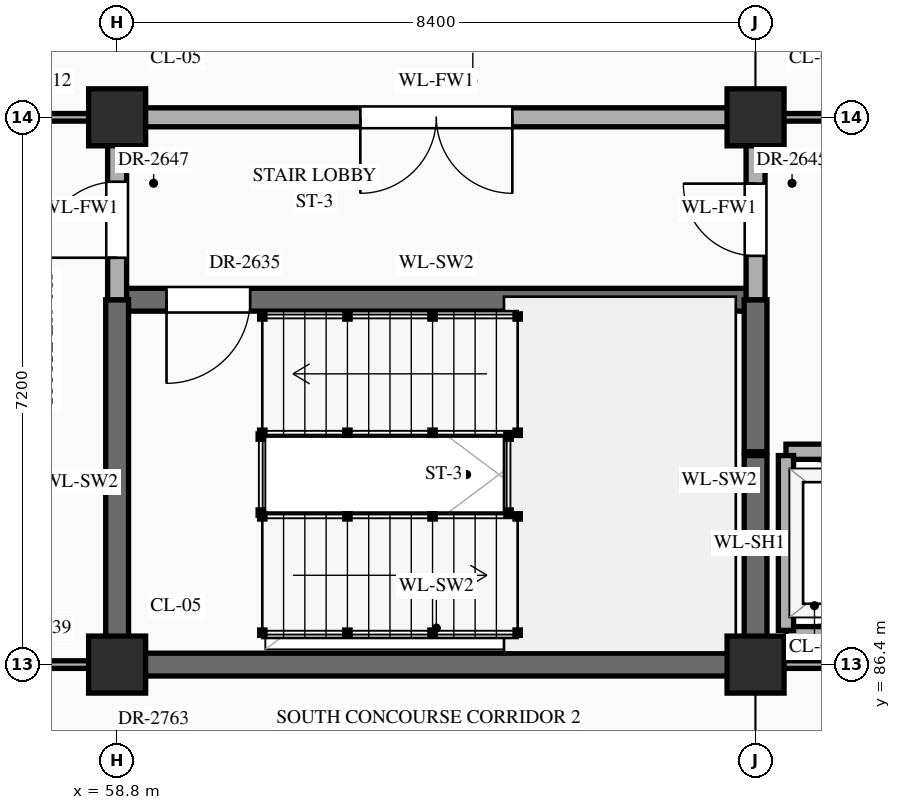
"""IFC4 building model, lengths in metres.
Left out: names, types, materials, properties, quantities, classifications, styles, units other than length and angle.
Written with IfcOpenShell. Run it as: python <this file> out.ifc"""

import sys

from ifc_helpers import new_model, si_unit, direction, frame, frame_2d, origin, origin_2d, place, context, subcontext, project, spatial, rectangle, extrude, element, fill, save


model = new_model("IFC4")
c1 = context("Model", 3, precision=1e-05, world=origin(), true_north=direction((0.0, 1.0)))
c2 = subcontext(c1, "Body", "Model", "MODEL_VIEW")
j1 = project(units=[si_unit("LENGTHUNIT", "METRE"), si_unit("PLANEANGLEUNIT", "RADIAN")], contexts=[c1])
p1 = place(None, origin())
s1 = spatial("IfcSite", under=j1, at=p1, CompositionType="ELEMENT")
p2 = place(p1, origin())
s2 = spatial("IfcBuilding", under=s1, at=p2, CompositionType="ELEMENT")
p3 = place(p2, frame((0.0, 0.0, 39.3)))
s3 = spatial("IfcBuildingStorey", under=s2, at=p3, CompositionType="ELEMENT", Elevation=39.3)
for number, where, z_axis, x_axis in (
    (1, (58.8, 86.4, 0.0), (0.0, 0.0, 1.0), (1.0, 0.0, 0.0)),
    (2, (58.8, 93.6, 0.0), (0.0, 0.0, 1.0), (1.0, 0.0, 0.0)),
    (3, (67.2, 86.4, 0.0), (0.0, 0.0, 1.0), (1.0, 0.0, 0.0)),
    (4, (67.2, 93.6, 0.0), (0.0, 0.0, 1.0), (1.0, 0.0, 0.0)),
):
    element("IfcColumn", number, at=place(p3, frame(where, z_axis=z_axis, x_axis=x_axis)), inside=s3, PredefinedType="COLUMN", context=c2, shape_type="SweptSolid", body=[
        extrude(rectangle(XDim=0.75, YDim=0.75, at=origin_2d()), origin(), (0.0, 0.0, 1.0), 4.2),
    ])
p4 = place(p3, frame((50.4, 86.4, 0.0), z_axis=(0.0, 0.0, 1.0), x_axis=(1.0, 0.0, 0.0)))
e5 = element("IfcWall", 5, at=p4, inside=s3, PredefinedType="STANDARD", context=c2, shape_type="SweptSolid", body=[
    extrude(rectangle(XDim=8.4, YDim=0.1, at=frame_2d((4.2, 0.0))), origin(), (0.0, 0.0, 1.0), 3.1),
])
p5 = place(p4, frame((0.968, 0.0, 0.0)))
e6 = element("IfcOpeningElement", 6, at=p5, cuts=e5, PredefinedType="OPENING", context=c2, shape_type="SweptSolid", body=[
    extrude(rectangle(XDim=1.16, YDim=2.3, at=frame_2d((0.58, 1.15))), frame((0.0, 0.062, 0.0), z_axis=(0.0, -1.0, 0.0), x_axis=(1.0, 0.0, 0.0)), (0.0, 0.0, 1.0), 0.124),
])
p6 = place(p4, frame((3.58, 0.0, 0.0)))
e7 = element("IfcOpeningElement", 7, at=p6, cuts=e5, PredefinedType="OPENING", context=c2, shape_type="SweptSolid", body=[
    extrude(rectangle(XDim=1.24, YDim=2.3, at=frame_2d((0.62, 1.15))), frame((0.0, 0.062, 0.0), z_axis=(0.0, -1.0, 0.0), x_axis=(1.0, 0.0, 0.0)), (0.0, 0.0, 1.0), 0.124),
])
p7 = place(p4, frame((6.212, 0.0, 0.0)))
e8 = element("IfcOpeningElement", 8, at=p7, cuts=e5, PredefinedType="OPENING", context=c2, shape_type="SweptSolid", body=[
    extrude(rectangle(XDim=1.28, YDim=2.35, at=frame_2d((0.64, 1.175))), frame((0.0, 0.062, 0.0), z_axis=(0.0, -1.0, 0.0), x_axis=(1.0, 0.0, 0.0)), (0.0, 0.0, 1.0), 0.124),
])
p8 = place(p3, frame((58.8, 86.4, 0.0), z_axis=(0.0, 0.0, 1.0), x_axis=(1.0, 0.0, 0.0)))
e9 = element("IfcWall", 9, at=p8, inside=s3, PredefinedType="SHEAR", context=c2, shape_type="SweptSolid", body=[
    extrude(rectangle(XDim=8.4, YDim=0.3, at=frame_2d((4.2, 0.0))), origin(), (0.0, 0.0, 1.0), 3.95),
])
p9 = place(p3, frame((67.25, 86.4, 0.0), z_axis=(0.0, 0.0, 1.0), x_axis=(1.0, 0.0, 0.0)))
e10 = element("IfcWall", 10, at=p9, inside=s3, PredefinedType="STANDARD", context=c2, shape_type="SweptSolid", body=[
    extrude(rectangle(XDim=8.3, YDim=0.1, at=frame_2d((4.15, 0.0))), origin(), (0.0, 0.0, 1.0), 3.1),
])
p10 = place(p3, frame((67.6, 86.8, 0.0), z_axis=(0.0, 0.0, 1.0), x_axis=(1.0, 0.0, 0.0)))
e11 = element("IfcWall", 11, at=p10, inside=s3, PredefinedType="STANDARD", context=c2, shape_type="SweptSolid", body=[
    extrude(rectangle(XDim=2.5, YDim=0.2, at=frame_2d((1.25, 0.0))), origin(), (0.0, 0.0, 1.0), 3.95),
])
p11 = place(p3, frame((67.6, 89.2, 0.0), z_axis=(0.0, 0.0, 1.0), x_axis=(1.0, 0.0, 0.0)))
e12 = element("IfcWall", 12, at=p11, inside=s3, PredefinedType="STANDARD", context=c2, shape_type="SweptSolid", body=[
    extrude(rectangle(XDim=7.7, YDim=0.2, at=frame_2d((3.85, 0.0))), origin(), (0.0, 0.0, 1.0), 3.95),
])
p12 = place(p11, frame((0.725, 0.0, 0.0)))
e13 = element("IfcOpeningElement", 13, at=p12, cuts=e12, PredefinedType="OPENING", context=c2, shape_type="SweptSolid", body=[
    extrude(rectangle(XDim=1.1, YDim=2.15, at=frame_2d((0.55, 1.075))), frame((0.0, 0.112, 0.0), z_axis=(0.0, -1.0, 0.0), x_axis=(1.0, 0.0, 0.0)), (0.0, 0.0, 1.0), 0.224),
])
p13 = place(p11, frame((3.3, 0.0, 0.0)))
e14 = element("IfcOpeningElement", 14, at=p13, cuts=e12, PredefinedType="OPENING", context=c2, shape_type="SweptSolid", body=[
    extrude(rectangle(XDim=1.1, YDim=2.15, at=frame_2d((0.55, 1.075))), frame((0.0, 0.112, 0.0), z_axis=(0.0, -1.0, 0.0), x_axis=(1.0, 0.0, 0.0)), (0.0, 0.0, 1.0), 0.224),
])
p14 = place(p11, frame((5.875, 0.0, 0.0)))
e15 = element("IfcOpeningElement", 15, at=p14, cuts=e12, PredefinedType="OPENING", context=c2, shape_type="SweptSolid", body=[
    extrude(rectangle(XDim=1.1, YDim=2.15, at=frame_2d((0.55, 1.075))), frame((0.0, 0.112, 0.0), z_axis=(0.0, -1.0, 0.0), x_axis=(1.0, 0.0, 0.0)), (0.0, 0.0, 1.0), 0.224),
])
p15 = place(p3, frame((58.8, 91.2, 0.0), z_axis=(0.0, 0.0, 1.0), x_axis=(1.0, 0.0, 0.0)))
e16 = element("IfcWall", 16, at=p15, inside=s3, PredefinedType="SHEAR", context=c2, shape_type="SweptSolid", body=[
    extrude(rectangle(XDim=8.4, YDim=0.3, at=frame_2d((4.2, 0.0))), origin(), (0.0, 0.0, 1.0), 3.95),
])
p16 = place(p15, frame((0.65, 0.0, 0.0)))
e17 = element("IfcOpeningElement", 17, at=p16, cuts=e16, PredefinedType="OPENING", context=c2, shape_type="SweptSolid", body=[
    extrude(rectangle(XDim=1.1, YDim=2.2, at=frame_2d((0.55, 1.1))), frame((0.0, 0.162, 0.0), z_axis=(0.0, -1.0, 0.0), x_axis=(1.0, 0.0, 0.0)), (0.0, 0.0, 1.0), 0.324),
])
p17 = place(p3, frame((50.4, 93.6, 0.0), z_axis=(0.0, 0.0, 1.0), x_axis=(1.0, 0.0, 0.0)))
e18 = element("IfcWall", 18, at=p17, inside=s3, PredefinedType="STANDARD", context=c2, shape_type="SweptSolid", body=[
    extrude(rectangle(XDim=8.4, YDim=0.1, at=frame_2d((4.2, 0.0))), origin(), (0.0, 0.0, 1.0), 3.1),
])
p18 = place(p17, frame((0.978, 0.0, 0.0)))
e19 = element("IfcOpeningElement", 19, at=p18, cuts=e18, PredefinedType="OPENING", context=c2, shape_type="SweptSolid", body=[
    extrude(rectangle(XDim=1.14, YDim=2.4, at=frame_2d((0.57, 1.2))), frame((0.0, 0.062, 0.0), z_axis=(0.0, -1.0, 0.0), x_axis=(1.0, 0.0, 0.0)), (0.0, 0.0, 1.0), 0.124),
])
p19 = place(p17, frame((3.75, 0.0, 0.0)))
e20 = element("IfcOpeningElement", 20, at=p19, cuts=e18, PredefinedType="OPENING", context=c2, shape_type="SweptSolid", body=[
    extrude(rectangle(XDim=0.9, YDim=2.15, at=frame_2d((0.45, 1.075))), frame((0.0, 0.062, 0.0), z_axis=(0.0, -1.0, 0.0), x_axis=(1.0, 0.0, 0.0)), (0.0, 0.0, 1.0), 0.124),
])
p20 = place(p17, frame((6.423, 0.0, 0.0)))
e21 = element("IfcOpeningElement", 21, at=p20, cuts=e18, PredefinedType="OPENING", context=c2, shape_type="SweptSolid", body=[
    extrude(rectangle(XDim=0.86, YDim=2.1, at=frame_2d((0.43, 1.05))), frame((0.0, 0.062, 0.0), z_axis=(0.0, -1.0, 0.0), x_axis=(1.0, 0.0, 0.0)), (0.0, 0.0, 1.0), 0.124),
])
p21 = place(p3, frame((58.8, 93.6, 0.0), z_axis=(0.0, 0.0, 1.0), x_axis=(1.0, 0.0, 0.0)))
e22 = element("IfcWall", 22, at=p21, inside=s3, PredefinedType="STANDARD", context=c2, shape_type="SweptSolid", body=[
    extrude(rectangle(XDim=8.4, YDim=0.25, at=frame_2d((4.2, 0.0))), origin(), (0.0, 0.0, 1.0), 3.1),
])
p22 = place(p21, frame((3.2, 0.0, 0.0)))
e23 = element("IfcOpeningElement", 23, at=p22, cuts=e22, PredefinedType="OPENING", context=c2, shape_type="SweptSolid", body=[
    extrude(rectangle(XDim=2.0, YDim=2.4, at=frame_2d((1.0, 1.2))), frame((0.0, 0.137, 0.0), z_axis=(0.0, -1.0, 0.0), x_axis=(1.0, 0.0, 0.0)), (0.0, 0.0, 1.0), 0.274),
])
p23 = place(p3, frame((67.2, 93.6, 0.0), z_axis=(0.0, 0.0, 1.0), x_axis=(1.0, 0.0, 0.0)))
e24 = element("IfcWall", 24, at=p23, inside=s3, PredefinedType="STANDARD", context=c2, shape_type="SweptSolid", body=[
    extrude(rectangle(XDim=33.6, YDim=0.1, at=frame_2d((16.8, 0.0))), origin(), (0.0, 0.0, 1.0), 3.1),
])
p24 = place(p23, frame((3.425, 0.0, 0.0)))
e25 = element("IfcOpeningElement", 25, at=p24, cuts=e24, PredefinedType="OPENING", context=c2, shape_type="SweptSolid", body=[
    extrude(rectangle(XDim=1.55, YDim=2.35, at=frame_2d((0.775, 1.175))), frame((0.0, 0.062, 0.0), z_axis=(0.0, -1.0, 0.0), x_axis=(1.0, 0.0, 0.0)), (0.0, 0.0, 1.0), 0.124),
])
p25 = place(p23, frame((28.55, 0.0, 0.0)))
e26 = element("IfcOpeningElement", 26, at=p25, cuts=e24, PredefinedType="OPENING", context=c2, shape_type="SweptSolid", body=[
    extrude(rectangle(XDim=1.7, YDim=2.45, at=frame_2d((0.85, 1.225))), frame((0.0, 0.062, 0.0), z_axis=(0.0, -1.0, 0.0), x_axis=(1.0, 0.0, 0.0)), (0.0, 0.0, 1.0), 0.124),
])
p26 = place(p23, frame((11.825, 0.0, 0.0)))
e27 = element("IfcOpeningElement", 27, at=p26, cuts=e24, PredefinedType="OPENING", context=c2, shape_type="SweptSolid", body=[
    extrude(rectangle(XDim=1.55, YDim=2.35, at=frame_2d((0.775, 1.175))), frame((0.0, 0.062, 0.0), z_axis=(0.0, -1.0, 0.0), x_axis=(1.0, 0.0, 0.0)), (0.0, 0.0, 1.0), 0.124),
])
p27 = place(p23, frame((17.708, 0.0, 0.0)))
e28 = element("IfcOpeningElement", 28, at=p27, cuts=e24, PredefinedType="OPENING", context=c2, shape_type="SweptSolid", body=[
    extrude(rectangle(XDim=1.28, YDim=2.35, at=frame_2d((0.64, 1.175))), frame((0.0, 0.062, 0.0), z_axis=(0.0, -1.0, 0.0), x_axis=(1.0, 0.0, 0.0)), (0.0, 0.0, 1.0), 0.124),
])
p28 = place(p23, frame((20.53, 0.0, 0.0)))
e29 = element("IfcOpeningElement", 29, at=p28, cuts=e24, PredefinedType="OPENING", context=c2, shape_type="SweptSolid", body=[
    extrude(rectangle(XDim=0.94, YDim=2.3, at=frame_2d((0.47, 1.15))), frame((0.0, 0.062, 0.0), z_axis=(0.0, -1.0, 0.0), x_axis=(1.0, 0.0, 0.0)), (0.0, 0.0, 1.0), 0.124),
])
p29 = place(p23, frame((23.163, 0.0, 0.0)))
e30 = element("IfcOpeningElement", 30, at=p29, cuts=e24, PredefinedType="OPENING", context=c2, shape_type="SweptSolid", body=[
    extrude(rectangle(XDim=0.98, YDim=2.35, at=frame_2d((0.49, 1.175))), frame((0.0, 0.062, 0.0), z_axis=(0.0, -1.0, 0.0), x_axis=(1.0, 0.0, 0.0)), (0.0, 0.0, 1.0), 0.124),
])
p30 = place(p3, frame((58.8, 86.4, 0.0), z_axis=(0.0, 0.0, 1.0), x_axis=(0.0, 1.0, 0.0)))
e31 = element("IfcWall", 31, at=p30, inside=s3, PredefinedType="SHEAR", context=c2, shape_type="SweptSolid", body=[
    extrude(rectangle(XDim=4.8, YDim=0.3, at=frame_2d((2.4, 0.0))), origin(), (0.0, 0.0, 1.0), 3.95),
])
p31 = place(p3, frame((58.8, 91.2, 0.0), z_axis=(0.0, 0.0, 1.0), x_axis=(0.0, 1.0, 0.0)))
e32 = element("IfcWall", 32, at=p31, inside=s3, PredefinedType="STANDARD", context=c2, shape_type="SweptSolid", body=[
    extrude(rectangle(XDim=2.4, YDim=0.25, at=frame_2d((1.2, 0.0))), origin(), (0.0, 0.0, 1.0), 3.2),
])
p32 = place(p31, frame((0.552, 0.0, 0.0)))
e33 = element("IfcOpeningElement", 33, at=p32, cuts=e32, PredefinedType="OPENING", context=c2, shape_type="SweptSolid", body=[
    extrude(rectangle(XDim=1.0, YDim=2.2, at=frame_2d((0.5, 1.1))), frame((0.0, 0.137, 0.0), z_axis=(0.0, -1.0, 0.0), x_axis=(1.0, 0.0, 0.0)), (0.0, 0.0, 1.0), 0.274),
])
p33 = place(p3, frame((67.2, 86.45, 0.0), z_axis=(0.0, 0.0, 1.0), x_axis=(0.0, 1.0, 0.0)))
e34 = element("IfcWall", 34, at=p33, inside=s3, PredefinedType="SHEAR", context=c2, shape_type="SweptSolid", body=[
    extrude(rectangle(XDim=2.7, YDim=0.3, at=frame_2d((1.35, 0.0))), origin(), (0.0, 0.0, 1.0), 3.95),
])
p34 = place(p3, frame((67.2, 89.2, 0.0), z_axis=(0.0, 0.0, 1.0), x_axis=(0.0, 1.0, 0.0)))
e35 = element("IfcWall", 35, at=p34, inside=s3, PredefinedType="SHEAR", context=c2, shape_type="SweptSolid", body=[
    extrude(rectangle(XDim=2.0, YDim=0.3, at=frame_2d((1.0, 0.0))), origin(), (0.0, 0.0, 1.0), 3.95),
])
p35 = place(p3, frame((67.2, 91.2, 0.0), z_axis=(0.0, 0.0, 1.0), x_axis=(0.0, 1.0, 0.0)))
e36 = element("IfcWall", 36, at=p35, inside=s3, PredefinedType="STANDARD", context=c2, shape_type="SweptSolid", body=[
    extrude(rectangle(XDim=2.4, YDim=0.25, at=frame_2d((1.2, 0.0))), origin(), (0.0, 0.0, 1.0), 3.2),
])
p36 = place(p35, frame((0.577, 0.0, 0.0)))
e37 = element("IfcOpeningElement", 37, at=p36, cuts=e36, PredefinedType="OPENING", context=c2, shape_type="SweptSolid", body=[
    extrude(rectangle(XDim=0.95, YDim=2.15, at=frame_2d((0.475, 1.075))), frame((0.0, 0.137, 0.0), z_axis=(0.0, -1.0, 0.0), x_axis=(1.0, 0.0, 0.0)), (0.0, 0.0, 1.0), 0.274),
])
p37 = place(p3, frame((67.6, 86.85, 0.0), z_axis=(0.0, 0.0, 1.0), x_axis=(0.0, 1.0, 0.0)))
e38 = element("IfcWall", 38, at=p37, inside=s3, PredefinedType="STANDARD", context=c2, shape_type="SweptSolid", body=[
    extrude(rectangle(XDim=2.3, YDim=0.2, at=frame_2d((1.15, 0.0))), origin(), (0.0, 0.0, 1.0), 3.95),
])
p38 = place(p16, frame((1.1, 0.0, 0.0), z_axis=(0.0, 0.0, 1.0), x_axis=(-1.0, 0.0, 0.0)))
e39 = element("IfcDoor", 39, at=p38, inside=s3, OperationType="SINGLE_SWING_RIGHT", PredefinedType="DOOR", context=c2, shape_type="SweptSolid", body=[
    extrude(rectangle(XDim=1.1, YDim=2.2, at=frame_2d((0.55, 1.1))), frame((0.0, 0.025, 0.0), z_axis=(0.0, -1.0, 0.0), x_axis=(1.0, 0.0, 0.0)), (0.0, 0.0, 1.0), 0.05),
])
fill(e17, e39)
p39 = place(p36, origin())
e40 = element("IfcDoor", 40, at=p39, inside=s3, OperationType="SINGLE_SWING_RIGHT", PredefinedType="DOOR", context=c2, shape_type="SweptSolid", body=[
    extrude(rectangle(XDim=0.95, YDim=2.15, at=frame_2d((0.475, 1.075))), frame((0.0, 0.025, 0.0), z_axis=(0.0, -1.0, 0.0), x_axis=(1.0, 0.0, 0.0)), (0.0, 0.0, 1.0), 0.05),
])
fill(e37, e40)
p40 = place(p22, frame((2.0, 0.0, 0.0), z_axis=(0.0, 0.0, 1.0), x_axis=(-1.0, 0.0, 0.0)))
e41 = element("IfcDoor", 41, at=p40, inside=s3, OperationType="DOUBLE_DOOR_SINGLE_SWING", PredefinedType="DOOR", context=c2, shape_type="SweptSolid", body=[
    extrude(rectangle(XDim=2.0, YDim=2.4, at=frame_2d((1.0, 1.2))), frame((0.0, 0.025, 0.0), z_axis=(0.0, -1.0, 0.0), x_axis=(1.0, 0.0, 0.0)), (0.0, 0.0, 1.0), 0.05),
])
fill(e23, e41)
p41 = place(p32, origin())
e42 = element("IfcDoor", 42, at=p41, inside=s3, OperationType="SINGLE_SWING_LEFT", PredefinedType="DOOR", context=c2, shape_type="SweptSolid", body=[
    extrude(rectangle(XDim=1.0, YDim=2.2, at=frame_2d((0.5, 1.1))), frame((0.0, 0.025, 0.0), z_axis=(0.0, -1.0, 0.0), x_axis=(1.0, 0.0, 0.0)), (0.0, 0.0, 1.0), 0.05),
])
fill(e33, e42)
save(model, sys.argv[1])
